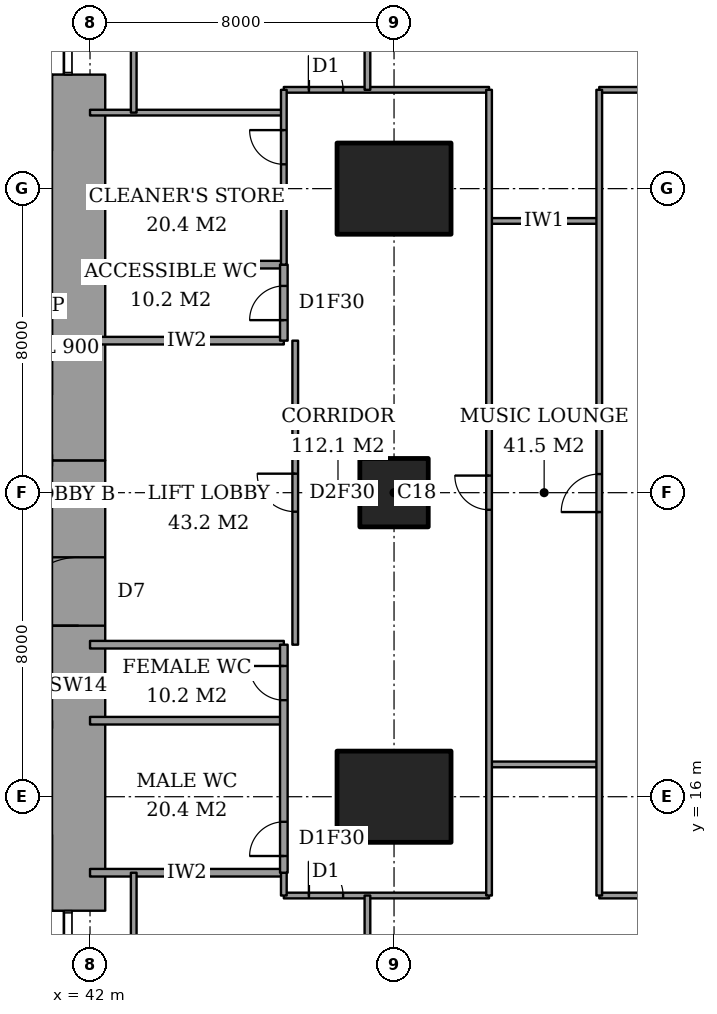
"""IFC4 building model, lengths in metres.
Left out: names, types, materials, properties, quantities, classifications, styles, units other than length and angle.
Written with IfcOpenShell. Run it as: python <this file> out.ifc"""

import sys

from ifc_helpers import new_model, si_unit, direction, frame, frame_2d, origin, origin_2d, place, context, subcontext, project, spatial, rectangle, extrude, element, fill, save


model = new_model("IFC4")
c1 = context("Model", 3, precision=1e-05, world=origin(), true_north=direction((0.0, 1.0)))
c2 = subcontext(c1, "Body", "Model", "MODEL_VIEW")
j1 = project(units=[si_unit("LENGTHUNIT", "METRE"), si_unit("PLANEANGLEUNIT", "RADIAN")], contexts=[c1])
p1 = place(None, origin())
s1 = spatial("IfcSite", under=j1, at=p1, CompositionType="ELEMENT")
p2 = place(p1, origin())
s2 = spatial("IfcBuilding", under=s1, at=p2, CompositionType="ELEMENT")
p3 = place(p2, frame((0.0, 0.0, 200.2)))
s3 = spatial("IfcBuildingStorey", under=s2, at=p3, CompositionType="ELEMENT", Elevation=200.2)
p4 = place(p3, frame((50.0, 16.0, 0.0), z_axis=(0.0, 0.0, 1.0), x_axis=(1.0, 0.0, 0.0)))
e1 = element("IfcColumn", 1, at=p4, inside=s3, PredefinedType="COLUMN", context=c2, shape_type="SweptSolid", body=[
    extrude(rectangle(XDim=3.0, YDim=2.4, at=origin_2d()), origin(), (0.0, 0.0, 1.0), 3.6),
])
p5 = place(p3, frame((50.0, 24.0, 0.0), z_axis=(0.0, 0.0, 1.0), x_axis=(1.0, 0.0, 0.0)))
e2 = element("IfcColumn", 2, at=p5, inside=s3, PredefinedType="COLUMN", context=c2, shape_type="SweptSolid", body=[
    extrude(rectangle(XDim=1.8, YDim=1.8, at=origin_2d()), origin(), (0.0, 0.0, 1.0), 3.6),
])
p6 = place(p3, frame((50.0, 32.0, 0.0), z_axis=(0.0, 0.0, 1.0), x_axis=(1.0, 0.0, 0.0)))
e3 = element("IfcColumn", 3, at=p6, inside=s3, PredefinedType="COLUMN", context=c2, shape_type="SweptSolid", body=[
    extrude(rectangle(XDim=3.0, YDim=2.4, at=origin_2d()), origin(), (0.0, 0.0, 1.0), 3.6),
])
p7 = place(p3, frame((41.7, 13.0, 0.0), z_axis=(0.0, 0.0, 1.0), x_axis=(0.0, 1.0, 0.0)))
e4 = element("IfcWall", 4, at=p7, inside=s3, PredefinedType="SHEAR", context=c2, shape_type="SweptSolid", body=[
    extrude(rectangle(XDim=11.85, YDim=1.4, at=frame_2d((5.925, 0.0))), origin(), (0.0, 0.0, 1.0), 3.6),
])
p8 = place(p7, frame((7.5, 0.0, 0.0)))
e5 = element("IfcOpeningElement", 5, at=p8, cuts=e4, PredefinedType="OPENING", context=c2, shape_type="SweptSolid", body=[
    extrude(rectangle(XDim=1.8, YDim=2.4, at=frame_2d((0.9, 1.2))), frame((0.0, 0.71, 0.0), z_axis=(0.0, -1.0, 0.0), x_axis=(1.0, 0.0, 0.0)), (0.0, 0.0, 1.0), 1.42),
])
p9 = place(p3, frame((41.7, 24.85, 0.0), z_axis=(0.0, 0.0, 1.0), x_axis=(0.0, 1.0, 0.0)))
e6 = element("IfcWall", 6, at=p9, inside=s3, PredefinedType="SHEAR", context=c2, shape_type="SweptSolid", body=[
    extrude(rectangle(XDim=10.15, YDim=1.4, at=frame_2d((5.075, 0.0))), origin(), (0.0, 0.0, 1.0), 3.6),
])
p10 = place(p3, frame((47.1, 13.4, 0.0), z_axis=(0.0, 0.0, 1.0), x_axis=(1.0, 0.0, 0.0)))
e7 = element("IfcWall", 7, at=p10, inside=s3, PredefinedType="PARTITIONING", context=c2, shape_type="SweptSolid", body=[
    extrude(rectangle(XDim=5.4, YDim=0.15, at=frame_2d((2.7, 0.0))), origin(), (0.0, 0.0, 1.0), 3.35),
])
p11 = place(p10, frame((0.66, 0.0, 0.0)))
e8 = element("IfcOpeningElement", 8, at=p11, cuts=e7, PredefinedType="OPENING", context=c2, shape_type="SweptSolid", body=[
    extrude(rectangle(XDim=0.9, YDim=2.1, at=frame_2d((0.45, 1.05))), frame((0.0, 0.085, 0.0), z_axis=(0.0, -1.0, 0.0), x_axis=(1.0, 0.0, 0.0)), (0.0, 0.0, 1.0), 0.17),
])
p12 = place(p3, frame((55.4, 13.4, 0.0), z_axis=(0.0, 0.0, 1.0), x_axis=(1.0, 0.0, 0.0)))
e9 = element("IfcWall", 9, at=p12, inside=s3, PredefinedType="PARTITIONING", context=c2, shape_type="SweptSolid", body=[
    extrude(rectangle(XDim=11.161, YDim=0.15, at=frame_2d((5.581, 0.0))), origin(), (0.0, 0.0, 1.0), 3.35),
])
p13 = place(p12, frame((6.88, 0.0, 0.0)))
e10 = element("IfcOpeningElement", 10, at=p13, cuts=e9, PredefinedType="OPENING", context=c2, shape_type="SweptSolid", body=[
    extrude(rectangle(XDim=0.9, YDim=2.1, at=frame_2d((0.45, 1.05))), frame((0.0, 0.085, 0.0), z_axis=(0.0, -1.0, 0.0), x_axis=(1.0, 0.0, 0.0)), (0.0, 0.0, 1.0), 0.17),
])
p14 = place(p3, frame((42.0, 14.0, 0.0), z_axis=(0.0, 0.0, 1.0), x_axis=(1.0, 0.0, 0.0)))
e11 = element("IfcWall", 11, at=p14, inside=s3, PredefinedType="PARTITIONING", context=c2, shape_type="SweptSolid", body=[
    extrude(rectangle(XDim=5.1, YDim=0.2, at=frame_2d((2.55, 0.0))), origin(), (0.0, 0.0, 1.0), 3.35),
])
p15 = place(p3, frame((52.5, 16.85, 0.0), z_axis=(0.0, 0.0, 1.0), x_axis=(1.0, 0.0, 0.0)))
e12 = element("IfcWall", 12, at=p15, inside=s3, PredefinedType="PARTITIONING", context=c2, shape_type="SweptSolid", body=[
    extrude(rectangle(XDim=2.9, YDim=0.15, at=frame_2d((1.45, 0.0))), origin(), (0.0, 0.0, 1.0), 3.35),
])
for number, where, z_axis, x_axis in (
    (13, (42.0, 18.0, 0.0), (0.0, 0.0, 1.0), (1.0, 0.0, 0.0)),
    (14, (42.0, 20.0, 0.0), (0.0, 0.0, 1.0), (1.0, 0.0, 0.0)),
    (15, (42.0, 28.0, 0.0), (0.0, 0.0, 1.0), (1.0, 0.0, 0.0)),
    (16, (42.0, 30.0, 0.0), (0.0, 0.0, 1.0), (1.0, 0.0, 0.0)),
):
    element("IfcWall", number, at=place(p3, frame(where, z_axis=z_axis, x_axis=x_axis)), inside=s3, PredefinedType="PARTITIONING", context=c2, shape_type="SweptSolid", body=[
        extrude(rectangle(XDim=5.1, YDim=0.2, at=frame_2d((2.55, 0.0))), origin(), (0.0, 0.0, 1.0), 3.35),
    ])
p16 = place(p3, frame((52.5, 31.15, 0.0), z_axis=(0.0, 0.0, 1.0), x_axis=(1.0, 0.0, 0.0)))
e17 = element("IfcWall", 17, at=p16, inside=s3, PredefinedType="PARTITIONING", context=c2, shape_type="SweptSolid", body=[
    extrude(rectangle(XDim=2.9, YDim=0.15, at=frame_2d((1.45, 0.0))), origin(), (0.0, 0.0, 1.0), 3.35),
])
p17 = place(p3, frame((42.0, 34.0, 0.0), z_axis=(0.0, 0.0, 1.0), x_axis=(1.0, 0.0, 0.0)))
e18 = element("IfcWall", 18, at=p17, inside=s3, PredefinedType="PARTITIONING", context=c2, shape_type="SweptSolid", body=[
    extrude(rectangle(XDim=5.1, YDim=0.15, at=frame_2d((2.55, 0.0))), origin(), (0.0, 0.0, 1.0), 3.35),
])
p18 = place(p3, frame((47.1, 34.6, 0.0), z_axis=(0.0, 0.0, 1.0), x_axis=(1.0, 0.0, 0.0)))
e19 = element("IfcWall", 19, at=p18, inside=s3, PredefinedType="PARTITIONING", context=c2, shape_type="SweptSolid", body=[
    extrude(rectangle(XDim=5.4, YDim=0.15, at=frame_2d((2.7, 0.0))), origin(), (0.0, 0.0, 1.0), 3.35),
])
p19 = place(p18, frame((0.66, 0.0, 0.0)))
e20 = element("IfcOpeningElement", 20, at=p19, cuts=e19, PredefinedType="OPENING", context=c2, shape_type="SweptSolid", body=[
    extrude(rectangle(XDim=0.9, YDim=2.1, at=frame_2d((0.45, 1.05))), frame((0.0, 0.085, 0.0), z_axis=(0.0, -1.0, 0.0), x_axis=(1.0, 0.0, 0.0)), (0.0, 0.0, 1.0), 0.17),
])
p20 = place(p3, frame((55.4, 34.6, 0.0), z_axis=(0.0, 0.0, 1.0), x_axis=(1.0, 0.0, 0.0)))
e21 = element("IfcWall", 21, at=p20, inside=s3, PredefinedType="PARTITIONING", context=c2, shape_type="SweptSolid", body=[
    extrude(rectangle(XDim=11.161, YDim=0.15, at=frame_2d((5.581, 0.0))), origin(), (0.0, 0.0, 1.0), 3.35),
])
p21 = place(p20, frame((6.88, 0.0, 0.0)))
e22 = element("IfcOpeningElement", 22, at=p21, cuts=e21, PredefinedType="OPENING", context=c2, shape_type="SweptSolid", body=[
    extrude(rectangle(XDim=0.9, YDim=2.1, at=frame_2d((0.45, 1.05))), frame((0.0, 0.085, 0.0), z_axis=(0.0, -1.0, 0.0), x_axis=(1.0, 0.0, 0.0)), (0.0, 0.0, 1.0), 0.17),
])
for number, where, z_axis, x_axis in (
    (23, (43.15, 9.3, 0.0), (0.0, 0.0, 1.0), (0.0, 1.0, 0.0)),
    (24, (43.15, 34.0, 0.0), (0.0, 0.0, 1.0), (0.0, 1.0, 0.0)),
):
    element("IfcWall", number, at=place(p3, frame(where, z_axis=z_axis, x_axis=x_axis)), inside=s3, PredefinedType="PARTITIONING", context=c2, shape_type="SweptSolid", body=[
        extrude(rectangle(XDim=4.7, YDim=0.15, at=frame_2d((2.35, 0.0))), origin(), (0.0, 0.0, 1.0), 3.35),
    ])
p22 = place(p3, frame((47.1, 14.0, 0.0), z_axis=(0.0, 0.0, 1.0), x_axis=(0.0, 1.0, 0.0)))
e25 = element("IfcWall", 25, at=p22, inside=s3, PredefinedType="PARTITIONING", context=c2, shape_type="SweptSolid", body=[
    extrude(rectangle(XDim=6.0, YDim=0.2, at=frame_2d((3.0, 0.0))), origin(), (0.0, 0.0, 1.0), 3.35),
])
p23 = place(p22, frame((0.44, 0.0, 0.0)))
e26 = element("IfcOpeningElement", 26, at=p23, cuts=e25, PredefinedType="OPENING", context=c2, shape_type="SweptSolid", body=[
    extrude(rectangle(XDim=0.9, YDim=2.1, at=frame_2d((0.45, 1.05))), frame((0.0, 0.11, 0.0), z_axis=(0.0, -1.0, 0.0), x_axis=(1.0, 0.0, 0.0)), (0.0, 0.0, 1.0), 0.22),
])
p24 = place(p22, frame((4.54, 0.0, 0.0)))
e27 = element("IfcOpeningElement", 27, at=p24, cuts=e25, PredefinedType="OPENING", context=c2, shape_type="SweptSolid", body=[
    extrude(rectangle(XDim=0.9, YDim=2.1, at=frame_2d((0.45, 1.05))), frame((0.0, 0.11, 0.0), z_axis=(0.0, -1.0, 0.0), x_axis=(1.0, 0.0, 0.0)), (0.0, 0.0, 1.0), 0.22),
])
p25 = place(p3, frame((47.1, 28.0, 0.0), z_axis=(0.0, 0.0, 1.0), x_axis=(0.0, 1.0, 0.0)))
e28 = element("IfcWall", 28, at=p25, inside=s3, PredefinedType="PARTITIONING", context=c2, shape_type="SweptSolid", body=[
    extrude(rectangle(XDim=2.0, YDim=0.2, at=frame_2d((1.0, 0.0))), origin(), (0.0, 0.0, 1.0), 3.35),
])
p26 = place(p25, frame((0.54, 0.0, 0.0)))
e29 = element("IfcOpeningElement", 29, at=p26, cuts=e28, PredefinedType="OPENING", context=c2, shape_type="SweptSolid", body=[
    extrude(rectangle(XDim=0.9, YDim=2.1, at=frame_2d((0.45, 1.05))), frame((0.0, 0.11, 0.0), z_axis=(0.0, -1.0, 0.0), x_axis=(1.0, 0.0, 0.0)), (0.0, 0.0, 1.0), 0.22),
])
p27 = place(p3, frame((47.1, 13.4, 0.0), z_axis=(0.0, 0.0, 1.0), x_axis=(0.0, 1.0, 0.0)))
e30 = element("IfcWall", 30, at=p27, inside=s3, PredefinedType="PARTITIONING", context=c2, shape_type="SweptSolid", body=[
    extrude(rectangle(XDim=0.6, YDim=0.15, at=frame_2d((0.3, 0.0))), origin(), (0.0, 0.0, 1.0), 3.35),
])
p28 = place(p3, frame((47.1, 30.0, 0.0), z_axis=(0.0, 0.0, 1.0), x_axis=(0.0, 1.0, 0.0)))
e31 = element("IfcWall", 31, at=p28, inside=s3, PredefinedType="PARTITIONING", context=c2, shape_type="SweptSolid", body=[
    extrude(rectangle(XDim=4.6, YDim=0.15, at=frame_2d((2.3, 0.0))), origin(), (0.0, 0.0, 1.0), 3.35),
])
p29 = place(p28, frame((2.64, 0.0, 0.0)))
e32 = element("IfcOpeningElement", 32, at=p29, cuts=e31, PredefinedType="OPENING", context=c2, shape_type="SweptSolid", body=[
    extrude(rectangle(XDim=0.9, YDim=2.1, at=frame_2d((0.45, 1.05))), frame((0.0, 0.085, 0.0), z_axis=(0.0, -1.0, 0.0), x_axis=(1.0, 0.0, 0.0)), (0.0, 0.0, 1.0), 0.17),
])
p30 = place(p3, frame((47.4, 20.0, 0.0), z_axis=(0.0, 0.0, 1.0), x_axis=(0.0, 1.0, 0.0)))
e33 = element("IfcWall", 33, at=p30, inside=s3, PredefinedType="PARTITIONING", context=c2, shape_type="SweptSolid", body=[
    extrude(rectangle(XDim=8.0, YDim=0.15, at=frame_2d((4.0, 0.0))), origin(), (0.0, 0.0, 1.0), 3.35),
])
p31 = place(p30, frame((3.5, 0.0, 0.0)))
e34 = element("IfcOpeningElement", 34, at=p31, cuts=e33, PredefinedType="OPENING", context=c2, shape_type="SweptSolid", body=[
    extrude(rectangle(XDim=1.0, YDim=2.1, at=frame_2d((0.5, 1.05))), frame((0.0, 0.085, 0.0), z_axis=(0.0, -1.0, 0.0), x_axis=(1.0, 0.0, 0.0)), (0.0, 0.0, 1.0), 0.17),
])
for number, where, z_axis, x_axis in (
    (35, (49.3, 9.2, 0.0), (0.0, 0.0, 1.0), (0.0, 1.0, 0.0)),
    (36, (49.3, 34.6, 0.0), (0.0, 0.0, 1.0), (0.0, 1.0, 0.0)),
):
    element("IfcWall", number, at=place(p3, frame(where, z_axis=z_axis, x_axis=x_axis)), inside=s3, PredefinedType="PARTITIONING", context=c2, shape_type="SweptSolid", body=[
        extrude(rectangle(XDim=4.2, YDim=0.15, at=frame_2d((2.1, 0.0))), origin(), (0.0, 0.0, 1.0), 3.35),
    ])
p32 = place(p3, frame((52.5, 13.4, 0.0), z_axis=(0.0, 0.0, 1.0), x_axis=(0.0, 1.0, 0.0)))
e37 = element("IfcWall", 37, at=p32, inside=s3, PredefinedType="PARTITIONING", context=c2, shape_type="SweptSolid", body=[
    extrude(rectangle(XDim=21.2, YDim=0.15, at=frame_2d((10.6, 0.0))), origin(), (0.0, 0.0, 1.0), 3.35),
])
p33 = place(p32, frame((10.15, 0.0, 0.0)))
e38 = element("IfcOpeningElement", 38, at=p33, cuts=e37, PredefinedType="OPENING", context=c2, shape_type="SweptSolid", body=[
    extrude(rectangle(XDim=0.9, YDim=2.1, at=frame_2d((0.45, 1.05))), frame((0.0, 0.085, 0.0), z_axis=(0.0, -1.0, 0.0), x_axis=(1.0, 0.0, 0.0)), (0.0, 0.0, 1.0), 0.17),
])
p34 = place(p3, frame((55.4, 13.4, 0.0), z_axis=(0.0, 0.0, 1.0), x_axis=(0.0, 1.0, 0.0)))
e39 = element("IfcWall", 39, at=p34, inside=s3, PredefinedType="PARTITIONING", context=c2, shape_type="SweptSolid", body=[
    extrude(rectangle(XDim=21.2, YDim=0.15, at=frame_2d((10.6, 0.0))), origin(), (0.0, 0.0, 1.0), 3.35),
])
p35 = place(p34, frame((10.09, 0.0, 0.0)))
e40 = element("IfcOpeningElement", 40, at=p35, cuts=e39, PredefinedType="OPENING", context=c2, shape_type="SweptSolid", body=[
    extrude(rectangle(XDim=1.0, YDim=2.1, at=frame_2d((0.5, 1.05))), frame((0.0, 0.085, 0.0), z_axis=(0.0, -1.0, 0.0), x_axis=(1.0, 0.0, 0.0)), (0.0, 0.0, 1.0), 0.17),
])
p36 = place(p3, frame((28.3, 17.9, 0.0), z_axis=(0.0, 0.0, 1.0), x_axis=(1.0, 0.0, 0.0)))
e41 = element("IfcWall", 41, at=p36, inside=s3, PredefinedType="PARTITIONING", context=c2, shape_type="SweptSolid", body=[
    extrude(rectangle(XDim=12.7, YDim=0.2, at=frame_2d((6.35, 0.0))), origin(), (0.0, 0.0, 1.0), 3.6),
])
p37 = place(p36, frame((1.05, 0.0, 0.0)))
e42 = element("IfcOpeningElement", 42, at=p37, cuts=e41, PredefinedType="OPENING", context=c2, shape_type="SweptSolid", body=[
    extrude(rectangle(XDim=0.9, YDim=2.1, at=frame_2d((0.45, 1.05))), frame((0.0, 0.11, 0.0), z_axis=(0.0, -1.0, 0.0), x_axis=(1.0, 0.0, 0.0)), (0.0, 0.0, 1.0), 0.22),
])
p38 = place(p36, frame((10.6, 0.0, 0.0)))
e43 = element("IfcOpeningElement", 43, at=p38, cuts=e41, PredefinedType="OPENING", context=c2, shape_type="SweptSolid", body=[
    extrude(rectangle(XDim=1.2, YDim=2.1, at=frame_2d((0.6, 1.05))), frame((0.0, 0.11, 0.0), z_axis=(0.0, -1.0, 0.0), x_axis=(1.0, 0.0, 0.0)), (0.0, 0.0, 1.0), 0.22),
])
p39 = place(p35, origin())
e44 = element("IfcDoor", 44, at=p39, inside=s3, OperationType="SINGLE_SWING_RIGHT", PredefinedType="DOOR", context=c2, shape_type="SweptSolid", body=[
    extrude(rectangle(XDim=1.0, YDim=2.1, at=frame_2d((0.5, 1.05))), frame((0.0, 0.025, 0.0), z_axis=(0.0, -1.0, 0.0), x_axis=(1.0, 0.0, 0.0)), (0.0, 0.0, 1.0), 0.05),
])
fill(e40, e44)
p40 = place(p33, origin())
e45 = element("IfcDoor", 45, at=p40, inside=s3, OperationType="SINGLE_SWING_LEFT", PredefinedType="DOOR", context=c2, shape_type="SweptSolid", body=[
    extrude(rectangle(XDim=0.9, YDim=2.1, at=frame_2d((0.45, 1.05))), frame((0.0, 0.025, 0.0), z_axis=(0.0, -1.0, 0.0), x_axis=(1.0, 0.0, 0.0)), (0.0, 0.0, 1.0), 0.05),
])
fill(e38, e45)
p41 = place(p31, origin())
e46 = element("IfcDoor", 46, at=p41, inside=s3, OperationType="SINGLE_SWING_LEFT", PredefinedType="DOOR", context=c2, shape_type="SweptSolid", body=[
    extrude(rectangle(XDim=1.0, YDim=2.1, at=frame_2d((0.5, 1.05))), frame((0.0, 0.025, 0.0), z_axis=(0.0, -1.0, 0.0), x_axis=(1.0, 0.0, 0.0)), (0.0, 0.0, 1.0), 0.05),
])
fill(e34, e46)
p42 = place(p23, origin())
e47 = element("IfcDoor", 47, at=p42, inside=s3, OperationType="SINGLE_SWING_RIGHT", PredefinedType="DOOR", context=c2, shape_type="SweptSolid", body=[
    extrude(rectangle(XDim=0.9, YDim=2.1, at=frame_2d((0.45, 1.05))), frame((0.0, 0.025, 0.0), z_axis=(0.0, -1.0, 0.0), x_axis=(1.0, 0.0, 0.0)), (0.0, 0.0, 1.0), 0.05),
])
fill(e26, e47)
p43 = place(p24, origin())
e48 = element("IfcDoor", 48, at=p43, inside=s3, OperationType="SINGLE_SWING_LEFT", PredefinedType="DOOR", context=c2, shape_type="SweptSolid", body=[
    extrude(rectangle(XDim=0.9, YDim=2.1, at=frame_2d((0.45, 1.05))), frame((0.0, 0.025, 0.0), z_axis=(0.0, -1.0, 0.0), x_axis=(1.0, 0.0, 0.0)), (0.0, 0.0, 1.0), 0.05),
])
fill(e27, e48)
p44 = place(p26, origin())
e49 = element("IfcDoor", 49, at=p44, inside=s3, OperationType="SINGLE_SWING_RIGHT", PredefinedType="DOOR", context=c2, shape_type="SweptSolid", body=[
    extrude(rectangle(XDim=0.9, YDim=2.1, at=frame_2d((0.45, 1.05))), frame((0.0, 0.025, 0.0), z_axis=(0.0, -1.0, 0.0), x_axis=(1.0, 0.0, 0.0)), (0.0, 0.0, 1.0), 0.05),
])
fill(e29, e49)
p45 = place(p29, origin())
e50 = element("IfcDoor", 50, at=p45, inside=s3, OperationType="SINGLE_SWING_LEFT", PredefinedType="DOOR", context=c2, shape_type="SweptSolid", body=[
    extrude(rectangle(XDim=0.9, YDim=2.1, at=frame_2d((0.45, 1.05))), frame((0.0, 0.025, 0.0), z_axis=(0.0, -1.0, 0.0), x_axis=(1.0, 0.0, 0.0)), (0.0, 0.0, 1.0), 0.05),
])
fill(e32, e50)
p46 = place(p11, origin())
e51 = element("IfcDoor", 51, at=p46, inside=s3, OperationType="SINGLE_SWING_RIGHT", PredefinedType="DOOR", context=c2, shape_type="SweptSolid", body=[
    extrude(rectangle(XDim=0.9, YDim=2.1, at=frame_2d((0.45, 1.05))), frame((0.0, 0.025, 0.0), z_axis=(0.0, -1.0, 0.0), x_axis=(1.0, 0.0, 0.0)), (0.0, 0.0, 1.0), 0.05),
])
fill(e8, e51)
p47 = place(p19, origin())
e52 = element("IfcDoor", 52, at=p47, inside=s3, OperationType="SINGLE_SWING_RIGHT", PredefinedType="DOOR", context=c2, shape_type="SweptSolid", body=[
    extrude(rectangle(XDim=0.9, YDim=2.1, at=frame_2d((0.45, 1.05))), frame((0.0, 0.025, 0.0), z_axis=(0.0, -1.0, 0.0), x_axis=(1.0, 0.0, 0.0)), (0.0, 0.0, 1.0), 0.05),
])
fill(e20, e52)
p48 = place(p8, origin())
e53 = element("IfcDoor", 53, at=p48, inside=s3, OperationType="DOUBLE_DOOR_DOUBLE_SWING", PredefinedType="DOOR", context=c2, shape_type="SweptSolid", body=[
    extrude(rectangle(XDim=1.8, YDim=2.4, at=frame_2d((0.9, 1.2))), frame((0.0, 0.025, 0.0), z_axis=(0.0, -1.0, 0.0), x_axis=(1.0, 0.0, 0.0)), (0.0, 0.0, 1.0), 0.05),
])
fill(e5, e53)
save(model, sys.argv[1])
